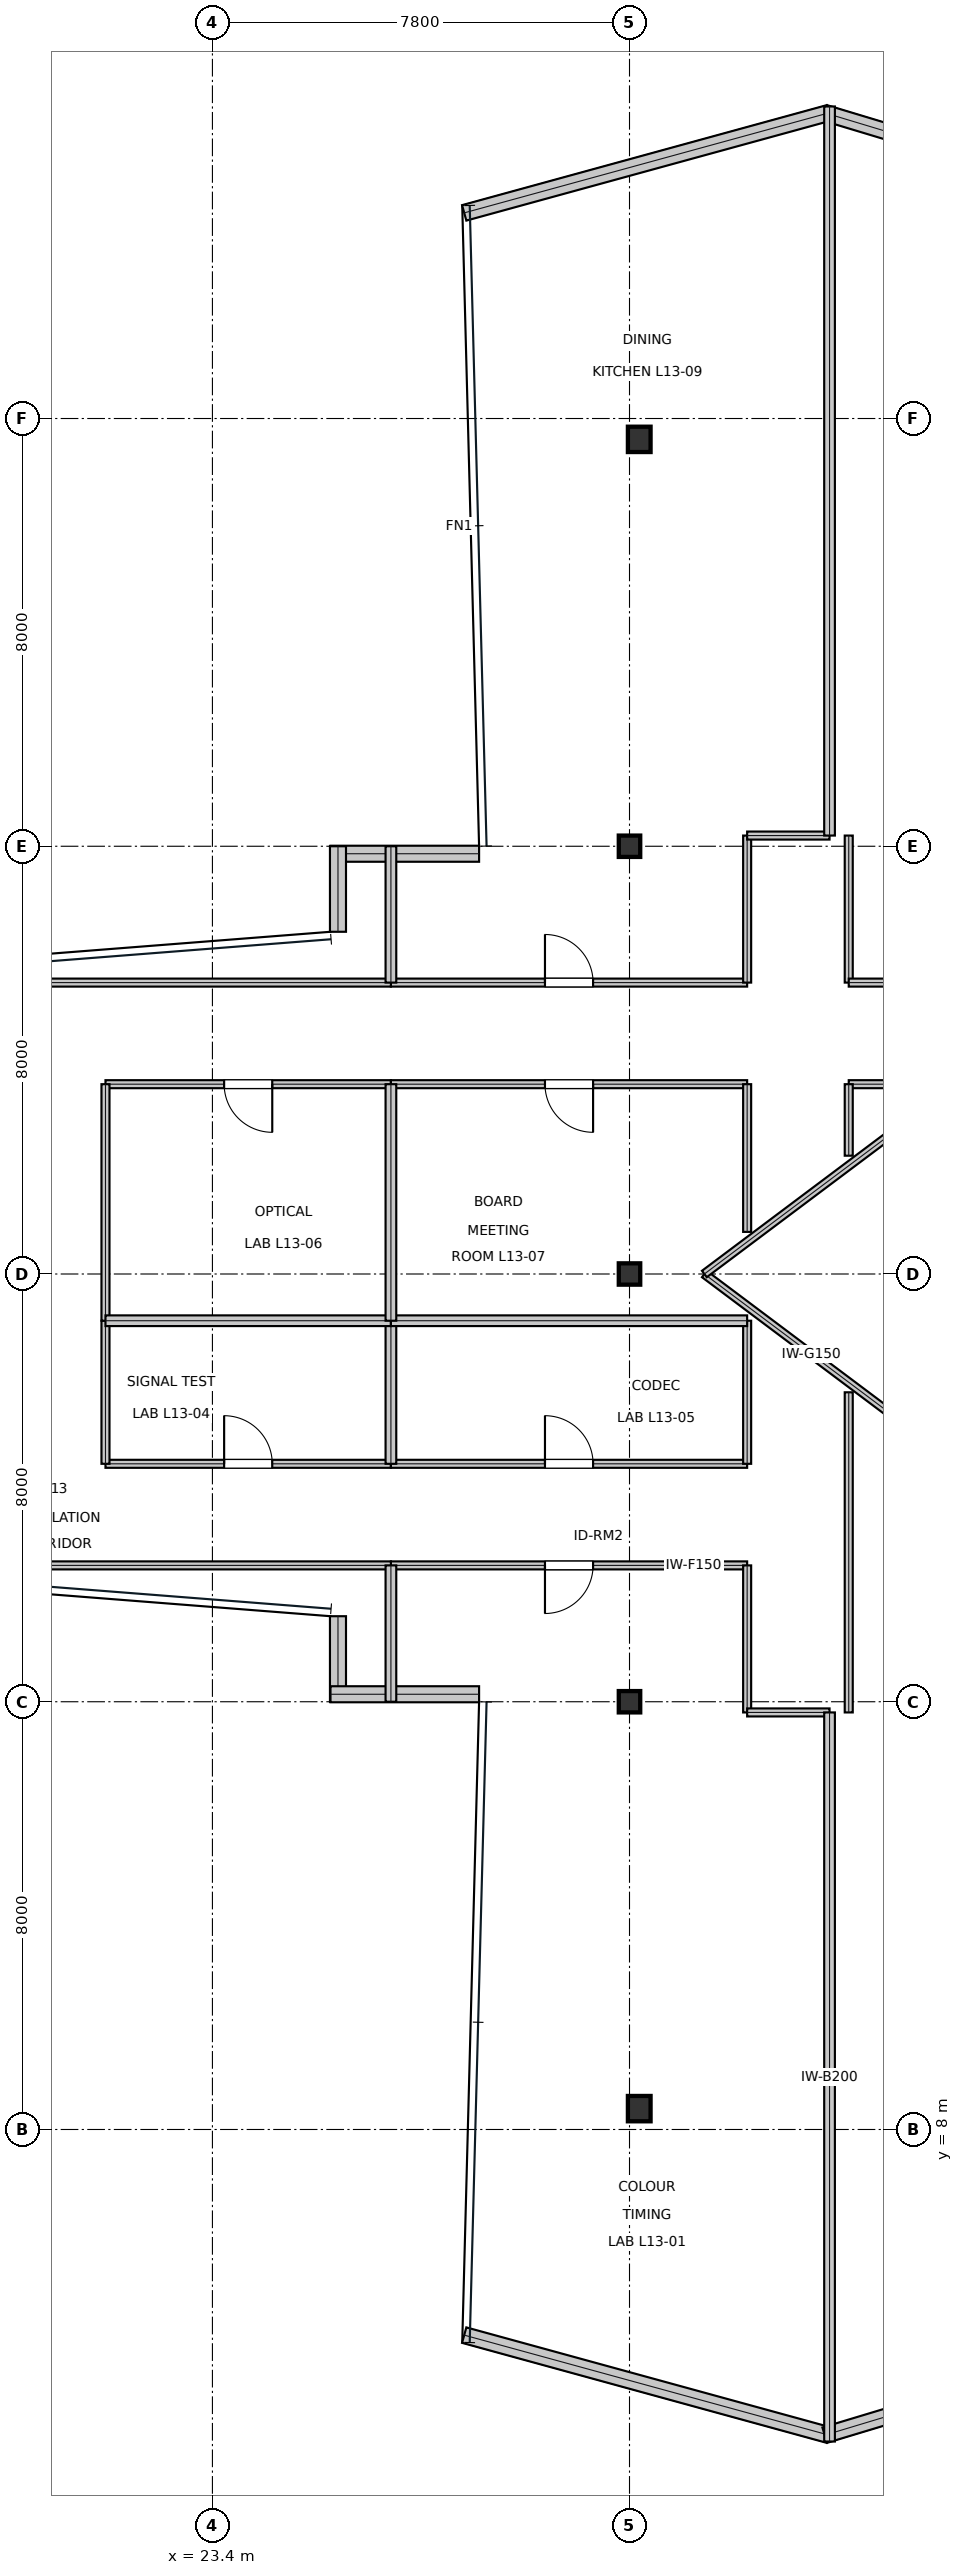
"""IFC4 building model, lengths in metres.
Left out: names, types, materials, properties, quantities, classifications, styles, units other than length and angle.
Written with IfcOpenShell. Run it as: python <this file> out.ifc"""

import sys

from ifc_helpers import new_model, si_unit, direction, frame, frame_2d, origin, origin_2d, place, context, subcontext, project, spatial, rectangle, i_section, extrude, element, fill, save


model = new_model("IFC4")
c1 = context("Model", 3, precision=1e-05, world=origin(), true_north=direction((0.0, 1.0)))
c2 = subcontext(c1, "Body", "Model", "MODEL_VIEW")
j1 = project(units=[si_unit("LENGTHUNIT", "METRE"), si_unit("PLANEANGLEUNIT", "RADIAN")], contexts=[c1])
p1 = place(None, origin())
s1 = spatial("IfcSite", under=j1, at=p1, CompositionType="ELEMENT")
p2 = place(p1, origin())
s2 = spatial("IfcBuilding", under=s1, at=p2, CompositionType="ELEMENT")
p3 = place(p2, frame((0.0, 0.0, 62.1)))
s3 = spatial("IfcBuildingStorey", under=s2, at=p3, CompositionType="ELEMENT", Elevation=62.1)
for number, where, z_axis, x_axis in (
    (1, (31.2, 16.0, 0.0), (0.0, 0.0, 1.0), (1.0, 0.0, 0.0)),
    (2, (31.2, 24.0, 0.0), (0.0, 0.0, 1.0), (1.0, 0.0, 0.0)),
    (3, (31.2, 32.0, 0.0), (0.0, 0.0, 1.0), (1.0, 0.0, 0.0)),
):
    element("IfcColumn", number, at=place(p3, frame(where, z_axis=z_axis, x_axis=x_axis)), inside=s3, PredefinedType="COLUMN", context=c2, shape_type="SweptSolid", body=[
        extrude(i_section(OverallWidth=0.401, OverallDepth=0.399, WebThickness=0.025, FlangeThickness=0.04, at=origin_2d()), origin(), (0.0, 0.0, 1.0), 4.044),
    ])
for number, where, z_axis, x_axis in (
    (4, (31.382, 39.61, 0.016), (0.0, 0.0, 1.0), (1.0, 0.0, 0.0)),
    (5, (31.382, 8.39, 0.016), (0.0, 0.0, 1.0), (1.0, 0.0, 0.0)),
):
    element("IfcColumn", number, at=place(p3, frame(where, z_axis=z_axis, x_axis=x_axis)), inside=s3, PredefinedType="COLUMN", context=c2, shape_type="SweptSolid", body=[
        extrude(i_section(OverallWidth=0.424, OverallDepth=0.474, WebThickness=0.048, FlangeThickness=0.077, at=origin_2d()), origin(), (0.0, 0.0, 1.0), 4.018),
    ])
p4 = place(p3, frame((41.67, 43.66, 0.0), z_axis=(0.0, 0.0, 1.0), x_axis=(-0.957387451844, 0.288806625707, 0.0)))
e6 = element("IfcWall", 6, at=p4, inside=s3, PredefinedType="STANDARD", context=c2, shape_type="SweptSolid", body=[
    extrude(rectangle(XDim=7.123, YDim=0.3, at=frame_2d((3.562, 0.0))), origin(), (0.0, 0.0, 1.0), 3.81),
])
p5 = place(p3, frame((34.928, 45.716, 0.0), z_axis=(0.0, 0.0, 1.0), x_axis=(-0.96439075506, -0.264481514581, 0.0)))
e7 = element("IfcWall", 7, at=p5, inside=s3, PredefinedType="STANDARD", context=c2, shape_type="SweptSolid", body=[
    extrude(rectangle(XDim=7.071, YDim=0.3, at=frame_2d((3.535, 0.0))), origin(), (0.0, 0.0, 1.0), 3.81),
])
p6 = place(p3, frame((28.387, 31.86, 0.0), z_axis=(0.0, 0.0, 1.0), x_axis=(-1.0, 0.0, 0.0)))
e8 = element("IfcWall", 8, at=p6, inside=s3, PredefinedType="STANDARD", context=c2, shape_type="SweptSolid", body=[
    extrude(rectangle(XDim=2.779, YDim=0.3, at=frame_2d((1.39, 0.0))), origin(), (0.0, 0.0, 1.0), 3.81),
])
for number, where, z_axis, x_axis in (
    (9, (25.748, 32.0, 0.0), (0.0, 0.0, 1.0), (0.0, -1.0, 0.0)),
    (10, (25.748, 17.6, 0.0), (0.0, 0.0, 1.0), (0.0, -1.0, 0.0)),
):
    element("IfcWall", number, at=place(p3, frame(where, z_axis=z_axis, x_axis=x_axis)), inside=s3, PredefinedType="STANDARD", context=c2, shape_type="SweptSolid", body=[
        extrude(rectangle(XDim=1.6, YDim=0.3, at=frame_2d((0.8, 0.0))), origin(), (0.0, 0.0, 1.0), 3.338),
    ])
p7 = place(p3, frame((25.608, 16.14, 0.0), z_axis=(0.0, 0.0, 1.0), x_axis=(1.0, 0.0, 0.0)))
e11 = element("IfcWall", 11, at=p7, inside=s3, PredefinedType="STANDARD", context=c2, shape_type="SweptSolid", body=[
    extrude(rectangle(XDim=2.779, YDim=0.3, at=frame_2d((1.39, 0.0))), origin(), (0.0, 0.0, 1.0), 3.81),
])
p8 = place(p3, frame((28.109, 4.154, 0.0), z_axis=(0.0, 0.0, 1.0), x_axis=(0.96439075506, -0.264481514581, 0.0)))
e12 = element("IfcWall", 12, at=p8, inside=s3, PredefinedType="STANDARD", context=c2, shape_type="SweptSolid", body=[
    extrude(rectangle(XDim=7.071, YDim=0.3, at=frame_2d((3.535, 0.0))), origin(), (0.0, 0.0, 1.0), 3.81),
])
p9 = place(p3, frame((34.851, 2.283, 0.0), z_axis=(0.0, 0.0, 1.0), x_axis=(0.957387451844, 0.288806625707, 0.0)))
e13 = element("IfcWall", 13, at=p9, inside=s3, PredefinedType="STANDARD", context=c2, shape_type="SweptSolid", body=[
    extrude(rectangle(XDim=7.123, YDim=0.3, at=frame_2d((3.562, 0.0))), origin(), (0.0, 0.0, 1.0), 3.81),
])
p10 = place(p3, frame((26.738, 18.55, 0.0), z_axis=(0.0, 0.0, 1.0), x_axis=(1.0, 0.0, 0.0)))
e14 = element("IfcWall", 14, at=p10, inside=s3, PredefinedType="PARTITIONING", context=c2, shape_type="SweptSolid", body=[
    extrude(rectangle(XDim=6.662, YDim=0.15, at=frame_2d((3.331, 0.0))), origin(), (0.0, 0.0, 1.0), 3.181),
])
p11 = place(p10, frame((2.881, 0.0, 0.0)))
e15 = element("IfcOpeningElement", 15, at=p11, cuts=e14, PredefinedType="OPENING", context=c2, shape_type="SweptSolid", body=[
    extrude(rectangle(XDim=0.9, YDim=2.15, at=frame_2d((0.45, 1.075))), frame((0.0, 0.085, 0.0), z_axis=(0.0, -1.0, 0.0), x_axis=(1.0, 0.0, 0.0)), (0.0, 0.0, 1.0), 0.17),
])
p12 = place(p3, frame((21.4, 20.45, 0.0), z_axis=(0.0, 0.0, 1.0), x_axis=(1.0, 0.0, 0.0)))
e16 = element("IfcWall", 16, at=p12, inside=s3, PredefinedType="PARTITIONING", context=c2, shape_type="SweptSolid", body=[
    extrude(rectangle(XDim=5.338, YDim=0.15, at=frame_2d((2.669, 0.0))), origin(), (0.0, 0.0, 1.0), 3.391),
])
p13 = place(p12, frame((2.219, 0.0, 0.0)))
e17 = element("IfcOpeningElement", 17, at=p13, cuts=e16, PredefinedType="OPENING", context=c2, shape_type="SweptSolid", body=[
    extrude(rectangle(XDim=0.9, YDim=2.15, at=frame_2d((0.45, 1.075))), frame((0.0, 0.085, 0.0), z_axis=(0.0, -1.0, 0.0), x_axis=(1.0, 0.0, 0.0)), (0.0, 0.0, 1.0), 0.17),
])
p14 = place(p3, frame((26.738, 20.45, 0.0), z_axis=(0.0, 0.0, 1.0), x_axis=(1.0, 0.0, 0.0)))
e18 = element("IfcWall", 18, at=p14, inside=s3, PredefinedType="PARTITIONING", context=c2, shape_type="SweptSolid", body=[
    extrude(rectangle(XDim=6.662, YDim=0.15, at=frame_2d((3.331, 0.0))), origin(), (0.0, 0.0, 1.0), 3.181),
])
p15 = place(p14, frame((2.881, 0.0, 0.0)))
e19 = element("IfcOpeningElement", 19, at=p15, cuts=e18, PredefinedType="OPENING", context=c2, shape_type="SweptSolid", body=[
    extrude(rectangle(XDim=0.9, YDim=2.15, at=frame_2d((0.45, 1.075))), frame((0.0, 0.085, 0.0), z_axis=(0.0, -1.0, 0.0), x_axis=(1.0, 0.0, 0.0)), (0.0, 0.0, 1.0), 0.17),
])
p16 = place(p3, frame((21.4, 27.55, 0.0), z_axis=(0.0, 0.0, 1.0), x_axis=(1.0, 0.0, 0.0)))
e20 = element("IfcWall", 20, at=p16, inside=s3, PredefinedType="PARTITIONING", context=c2, shape_type="SweptSolid", body=[
    extrude(rectangle(XDim=5.338, YDim=0.15, at=frame_2d((2.669, 0.0))), origin(), (0.0, 0.0, 1.0), 3.391),
])
p17 = place(p16, frame((2.219, 0.0, 0.0)))
e21 = element("IfcOpeningElement", 21, at=p17, cuts=e20, PredefinedType="OPENING", context=c2, shape_type="SweptSolid", body=[
    extrude(rectangle(XDim=0.9, YDim=2.15, at=frame_2d((0.45, 1.075))), frame((0.0, 0.085, 0.0), z_axis=(0.0, -1.0, 0.0), x_axis=(1.0, 0.0, 0.0)), (0.0, 0.0, 1.0), 0.17),
])
p18 = place(p3, frame((26.738, 27.55, 0.0), z_axis=(0.0, 0.0, 1.0), x_axis=(1.0, 0.0, 0.0)))
e22 = element("IfcWall", 22, at=p18, inside=s3, PredefinedType="PARTITIONING", context=c2, shape_type="SweptSolid", body=[
    extrude(rectangle(XDim=6.662, YDim=0.15, at=frame_2d((3.331, 0.0))), origin(), (0.0, 0.0, 1.0), 3.181),
])
p19 = place(p18, frame((2.881, 0.0, 0.0)))
e23 = element("IfcOpeningElement", 23, at=p19, cuts=e22, PredefinedType="OPENING", context=c2, shape_type="SweptSolid", body=[
    extrude(rectangle(XDim=0.9, YDim=2.15, at=frame_2d((0.45, 1.075))), frame((0.0, 0.085, 0.0), z_axis=(0.0, -1.0, 0.0), x_axis=(1.0, 0.0, 0.0)), (0.0, 0.0, 1.0), 0.17),
])
p20 = place(p3, frame((26.738, 29.45, 0.0), z_axis=(0.0, 0.0, 1.0), x_axis=(1.0, 0.0, 0.0)))
e24 = element("IfcWall", 24, at=p20, inside=s3, PredefinedType="PARTITIONING", context=c2, shape_type="SweptSolid", body=[
    extrude(rectangle(XDim=6.662, YDim=0.15, at=frame_2d((3.331, 0.0))), origin(), (0.0, 0.0, 1.0), 3.181),
])
p21 = place(p20, frame((2.881, 0.0, 0.0)))
e25 = element("IfcOpeningElement", 25, at=p21, cuts=e24, PredefinedType="OPENING", context=c2, shape_type="SweptSolid", body=[
    extrude(rectangle(XDim=0.9, YDim=2.15, at=frame_2d((0.45, 1.075))), frame((0.0, 0.085, 0.0), z_axis=(0.0, -1.0, 0.0), x_axis=(1.0, 0.0, 0.0)), (0.0, 0.0, 1.0), 0.17),
])
p22 = place(p3, frame((33.4, 15.8, 0.0), z_axis=(0.0, 0.0, 1.0), x_axis=(0.0, 1.0, 0.0)))
e26 = element("IfcWall", 26, at=p22, inside=s3, PredefinedType="PARTITIONING", context=c2, shape_type="SweptSolid", body=[
    extrude(rectangle(XDim=2.75, YDim=0.15, at=frame_2d((1.375, 0.0))), origin(), (0.0, 0.0, 1.0), 3.181),
])
p23 = place(p3, frame((33.4, 15.8, 0.0), z_axis=(0.0, 0.0, 1.0), x_axis=(1.0, 0.0, 0.0)))
e27 = element("IfcWall", 27, at=p23, inside=s3, PredefinedType="PARTITIONING", context=c2, shape_type="SweptSolid", body=[
    extrude(rectangle(XDim=1.541, YDim=0.15, at=frame_2d((0.771, 0.0))), origin(), (0.0, 0.0, 1.0), 3.181),
])
p24 = place(p3, frame((35.3, 15.8, 0.0), z_axis=(0.0, 0.0, 1.0), x_axis=(0.0, 1.0, 0.0)))
e28 = element("IfcWall", 28, at=p24, inside=s3, PredefinedType="PARTITIONING", context=c2, shape_type="SweptSolid", body=[
    extrude(rectangle(XDim=5.988, YDim=0.15, at=frame_2d((2.994, 0.0))), origin(), (0.0, 0.0, 1.0), 3.181),
])
p25 = place(p3, frame((35.3, 27.55, 0.0), z_axis=(0.0, 0.0, 1.0), x_axis=(1.0, 0.0, 0.0)))
e29 = element("IfcWall", 29, at=p25, inside=s3, PredefinedType="PARTITIONING", context=c2, shape_type="SweptSolid", body=[
    extrude(rectangle(XDim=1.75, YDim=0.15, at=frame_2d((0.875, 0.0))), origin(), (0.0, 0.0, 1.0), 3.391),
])
p26 = place(p3, frame((35.3, 26.212, 0.0), z_axis=(0.0, 0.0, 1.0), x_axis=(0.0, 1.0, 0.0)))
e30 = element("IfcWall", 30, at=p26, inside=s3, PredefinedType="PARTITIONING", context=c2, shape_type="SweptSolid", body=[
    extrude(rectangle(XDim=1.338, YDim=0.15, at=frame_2d((0.669, 0.0))), origin(), (0.0, 0.0, 1.0), 3.81),
])
p27 = place(p3, frame((13.604, 18.55, 0.0), z_axis=(0.0, 0.0, 1.0), x_axis=(1.0, 0.0, 0.0)))
e31 = element("IfcWall", 31, at=p27, inside=s3, PredefinedType="PARTITIONING", context=c2, shape_type="SweptSolid", body=[
    extrude(rectangle(XDim=13.135, YDim=0.15, at=frame_2d((6.567, 0.0))), origin(), (0.0, 0.0, 1.0), 3.338),
])
p28 = place(p3, frame((21.4, 20.45, 0.0), z_axis=(0.0, 0.0, 1.0), x_axis=(0.0, 1.0, 0.0)))
e32 = element("IfcWall", 32, at=p28, inside=s3, PredefinedType="PARTITIONING", context=c2, shape_type="SweptSolid", body=[
    extrude(rectangle(XDim=2.676, YDim=0.15, at=frame_2d((1.338, 0.0))), origin(), (0.0, 0.0, 1.0), 3.181),
])
p29 = place(p3, frame((33.4, 20.45, 0.0), z_axis=(0.0, 0.0, 1.0), x_axis=(0.0, 1.0, 0.0)))
e33 = element("IfcWall", 33, at=p29, inside=s3, PredefinedType="PARTITIONING", context=c2, shape_type="SweptSolid", body=[
    extrude(rectangle(XDim=2.676, YDim=0.15, at=frame_2d((1.338, 0.0))), origin(), (0.0, 0.0, 1.0), 3.81),
])
p30 = place(p3, frame((21.4, 23.126, 0.0), z_axis=(0.0, 0.0, 1.0), x_axis=(0.0, 1.0, 0.0)))
e34 = element("IfcWall", 34, at=p30, inside=s3, PredefinedType="PARTITIONING", context=c2, shape_type="SweptSolid", body=[
    extrude(rectangle(XDim=4.424, YDim=0.15, at=frame_2d((2.212, 0.0))), origin(), (0.0, 0.0, 1.0), 3.181),
])
p31 = place(p3, frame((33.4, 24.788, 0.0), z_axis=(0.0, 0.0, 1.0), x_axis=(0.0, 1.0, 0.0)))
e35 = element("IfcWall", 35, at=p31, inside=s3, PredefinedType="PARTITIONING", context=c2, shape_type="SweptSolid", body=[
    extrude(rectangle(XDim=2.762, YDim=0.15, at=frame_2d((1.381, 0.0))), origin(), (0.0, 0.0, 1.0), 3.81),
])
p32 = place(p3, frame((13.604, 29.45, 0.0), z_axis=(0.0, 0.0, 1.0), x_axis=(1.0, 0.0, 0.0)))
e36 = element("IfcWall", 36, at=p32, inside=s3, PredefinedType="PARTITIONING", context=c2, shape_type="SweptSolid", body=[
    extrude(rectangle(XDim=13.135, YDim=0.15, at=frame_2d((6.567, 0.0))), origin(), (0.0, 0.0, 1.0), 3.338),
])
p33 = place(p3, frame((33.4, 29.45, 0.0), z_axis=(0.0, 0.0, 1.0), x_axis=(0.0, 1.0, 0.0)))
e37 = element("IfcWall", 37, at=p33, inside=s3, PredefinedType="PARTITIONING", context=c2, shape_type="SweptSolid", body=[
    extrude(rectangle(XDim=2.75, YDim=0.15, at=frame_2d((1.375, 0.0))), origin(), (0.0, 0.0, 1.0), 3.181),
])
p34 = place(p3, frame((33.4, 32.2, 0.0), z_axis=(0.0, 0.0, 1.0), x_axis=(1.0, 0.0, 0.0)))
e38 = element("IfcWall", 38, at=p34, inside=s3, PredefinedType="PARTITIONING", context=c2, shape_type="SweptSolid", body=[
    extrude(rectangle(XDim=1.541, YDim=0.15, at=frame_2d((0.771, 0.0))), origin(), (0.0, 0.0, 1.0), 3.181),
])
p35 = place(p3, frame((35.3, 29.45, 0.0), z_axis=(0.0, 0.0, 1.0), x_axis=(0.0, 1.0, 0.0)))
e39 = element("IfcWall", 39, at=p35, inside=s3, PredefinedType="PARTITIONING", context=c2, shape_type="SweptSolid", body=[
    extrude(rectangle(XDim=2.75, YDim=0.15, at=frame_2d((1.375, 0.0))), origin(), (0.0, 0.0, 1.0), 3.181),
])
p36 = place(p3, frame((35.3, 29.45, 0.0), z_axis=(0.0, 0.0, 1.0), x_axis=(1.0, 0.0, 0.0)))
e40 = element("IfcWall", 40, at=p36, inside=s3, PredefinedType="PARTITIONING", context=c2, shape_type="SweptSolid", body=[
    extrude(rectangle(XDim=1.75, YDim=0.15, at=frame_2d((0.875, 0.0))), origin(), (0.0, 0.0, 1.0), 3.81),
])
p37 = place(p3, frame((34.941, 2.164, 0.0), z_axis=(0.0, 0.0, 1.0), x_axis=(0.0, 1.0, 0.0)))
e41 = element("IfcWall", 41, at=p37, inside=s3, PredefinedType="SOLIDWALL", context=c2, shape_type="SweptSolid", body=[
    extrude(rectangle(XDim=13.636, YDim=0.2, at=frame_2d((6.818, 0.0))), origin(), (0.0, 0.0, 1.0), 3.338),
])
p38 = place(p3, frame((26.738, 16.0, 0.0), z_axis=(0.0, 0.0, 1.0), x_axis=(0.0, 1.0, 0.0)))
e42 = element("IfcWall", 42, at=p38, inside=s3, PredefinedType="SOLIDWALL", context=c2, shape_type="SweptSolid", body=[
    extrude(rectangle(XDim=2.55, YDim=0.2, at=frame_2d((1.275, 0.0))), origin(), (0.0, 0.0, 1.0), 3.338),
])
p39 = place(p3, frame((26.738, 20.45, 0.0), z_axis=(0.0, 0.0, 1.0), x_axis=(0.0, 1.0, 0.0)))
e43 = element("IfcWall", 43, at=p39, inside=s3, PredefinedType="SOLIDWALL", context=c2, shape_type="SweptSolid", body=[
    extrude(rectangle(XDim=2.676, YDim=0.2, at=frame_2d((1.338, 0.0))), origin(), (0.0, 0.0, 1.0), 3.81),
])
p40 = place(p3, frame((21.4, 23.126, 0.0), z_axis=(0.0, 0.0, 1.0), x_axis=(1.0, 0.0, 0.0)))
e44 = element("IfcWall", 44, at=p40, inside=s3, PredefinedType="SOLIDWALL", context=c2, shape_type="SweptSolid", body=[
    extrude(rectangle(XDim=5.338, YDim=0.2, at=frame_2d((2.669, 0.0))), origin(), (0.0, 0.0, 1.0), 3.181),
])
p41 = place(p3, frame((26.738, 23.126, 0.0), z_axis=(0.0, 0.0, 1.0), x_axis=(1.0, 0.0, 0.0)))
e45 = element("IfcWall", 45, at=p41, inside=s3, PredefinedType="SOLIDWALL", context=c2, shape_type="SweptSolid", body=[
    extrude(rectangle(XDim=6.662, YDim=0.2, at=frame_2d((3.331, 0.0))), origin(), (0.0, 0.0, 1.0), 3.181),
])
p42 = place(p3, frame((26.738, 23.126, 0.0), z_axis=(0.0, 0.0, 1.0), x_axis=(0.0, 1.0, 0.0)))
e46 = element("IfcWall", 46, at=p42, inside=s3, PredefinedType="SOLIDWALL", context=c2, shape_type="SweptSolid", body=[
    extrude(rectangle(XDim=4.424, YDim=0.2, at=frame_2d((2.212, 0.0))), origin(), (0.0, 0.0, 1.0), 3.181),
])
p43 = place(p3, frame((26.738, 29.45, 0.0), z_axis=(0.0, 0.0, 1.0), x_axis=(0.0, 1.0, 0.0)))
e47 = element("IfcWall", 47, at=p43, inside=s3, PredefinedType="SOLIDWALL", context=c2, shape_type="SweptSolid", body=[
    extrude(rectangle(XDim=2.55, YDim=0.2, at=frame_2d((1.275, 0.0))), origin(), (0.0, 0.0, 1.0), 3.338),
])
p44 = place(p3, frame((34.941, 32.2, 0.0), z_axis=(0.0, 0.0, 1.0), x_axis=(0.0, 1.0, 0.0)))
e48 = element("IfcWall", 48, at=p44, inside=s3, PredefinedType="SOLIDWALL", context=c2, shape_type="SweptSolid", body=[
    extrude(rectangle(XDim=13.636, YDim=0.2, at=frame_2d((6.818, 0.0))), origin(), (0.0, 0.0, 1.0), 3.338),
])
for number, where, z_axis, x_axis in (
    (49, (32.6, 24.0, 0.0), (0.0, 0.0, 1.0), (0.8, -0.6, 0.0)),
    (50, (36.6, 27.0, 0.0), (0.0, 0.0, 1.0), (-0.8, -0.6, 0.0)),
):
    element("IfcWall", number, at=place(p3, frame(where, z_axis=z_axis, x_axis=x_axis)), inside=s3, PredefinedType="MOVABLE", context=c2, shape_type="SweptSolid", body=[
        extrude(rectangle(XDim=5.0, YDim=0.15, at=frame_2d((2.5, 0.0))), origin(), (0.0, 0.0, 1.0), 3.81),
    ])
p45 = place(p11, frame((0.9, 0.0, 0.0), z_axis=(0.0, 0.0, 1.0), x_axis=(-1.0, 0.0, 0.0)))
e51 = element("IfcDoor", 51, at=p45, inside=s3, OperationType="SINGLE_SWING_RIGHT", PredefinedType="DOOR", context=c2, shape_type="SweptSolid", body=[
    extrude(rectangle(XDim=0.9, YDim=2.15, at=frame_2d((0.45, 1.075))), frame((0.0, 0.025, 0.0), z_axis=(0.0, -1.0, 0.0), x_axis=(1.0, 0.0, 0.0)), (0.0, 0.0, 1.0), 0.05),
])
fill(e15, e51)
p46 = place(p13, origin())
e52 = element("IfcDoor", 52, at=p46, inside=s3, OperationType="SINGLE_SWING_LEFT", PredefinedType="DOOR", context=c2, shape_type="SweptSolid", body=[
    extrude(rectangle(XDim=0.9, YDim=2.15, at=frame_2d((0.45, 1.075))), frame((0.0, 0.025, 0.0), z_axis=(0.0, -1.0, 0.0), x_axis=(1.0, 0.0, 0.0)), (0.0, 0.0, 1.0), 0.05),
])
fill(e17, e52)
p47 = place(p15, origin())
e53 = element("IfcDoor", 53, at=p47, inside=s3, OperationType="SINGLE_SWING_LEFT", PredefinedType="DOOR", context=c2, shape_type="SweptSolid", body=[
    extrude(rectangle(XDim=0.9, YDim=2.15, at=frame_2d((0.45, 1.075))), frame((0.0, 0.025, 0.0), z_axis=(0.0, -1.0, 0.0), x_axis=(1.0, 0.0, 0.0)), (0.0, 0.0, 1.0), 0.05),
])
fill(e19, e53)
p48 = place(p17, frame((0.9, 0.0, 0.0), z_axis=(0.0, 0.0, 1.0), x_axis=(-1.0, 0.0, 0.0)))
e54 = element("IfcDoor", 54, at=p48, inside=s3, OperationType="SINGLE_SWING_LEFT", PredefinedType="DOOR", context=c2, shape_type="SweptSolid", body=[
    extrude(rectangle(XDim=0.9, YDim=2.15, at=frame_2d((0.45, 1.075))), frame((0.0, 0.025, 0.0), z_axis=(0.0, -1.0, 0.0), x_axis=(1.0, 0.0, 0.0)), (0.0, 0.0, 1.0), 0.05),
])
fill(e21, e54)
p49 = place(p19, frame((0.9, 0.0, 0.0), z_axis=(0.0, 0.0, 1.0), x_axis=(-1.0, 0.0, 0.0)))
e55 = element("IfcDoor", 55, at=p49, inside=s3, OperationType="SINGLE_SWING_LEFT", PredefinedType="DOOR", context=c2, shape_type="SweptSolid", body=[
    extrude(rectangle(XDim=0.9, YDim=2.15, at=frame_2d((0.45, 1.075))), frame((0.0, 0.025, 0.0), z_axis=(0.0, -1.0, 0.0), x_axis=(1.0, 0.0, 0.0)), (0.0, 0.0, 1.0), 0.05),
])
fill(e23, e55)
p50 = place(p21, origin())
e56 = element("IfcDoor", 56, at=p50, inside=s3, OperationType="SINGLE_SWING_LEFT", PredefinedType="DOOR", context=c2, shape_type="SweptSolid", body=[
    extrude(rectangle(XDim=0.9, YDim=2.15, at=frame_2d((0.45, 1.075))), frame((0.0, 0.025, 0.0), z_axis=(0.0, -1.0, 0.0), x_axis=(1.0, 0.0, 0.0)), (0.0, 0.0, 1.0), 0.05),
])
fill(e25, e56)
save(model, sys.argv[1])
